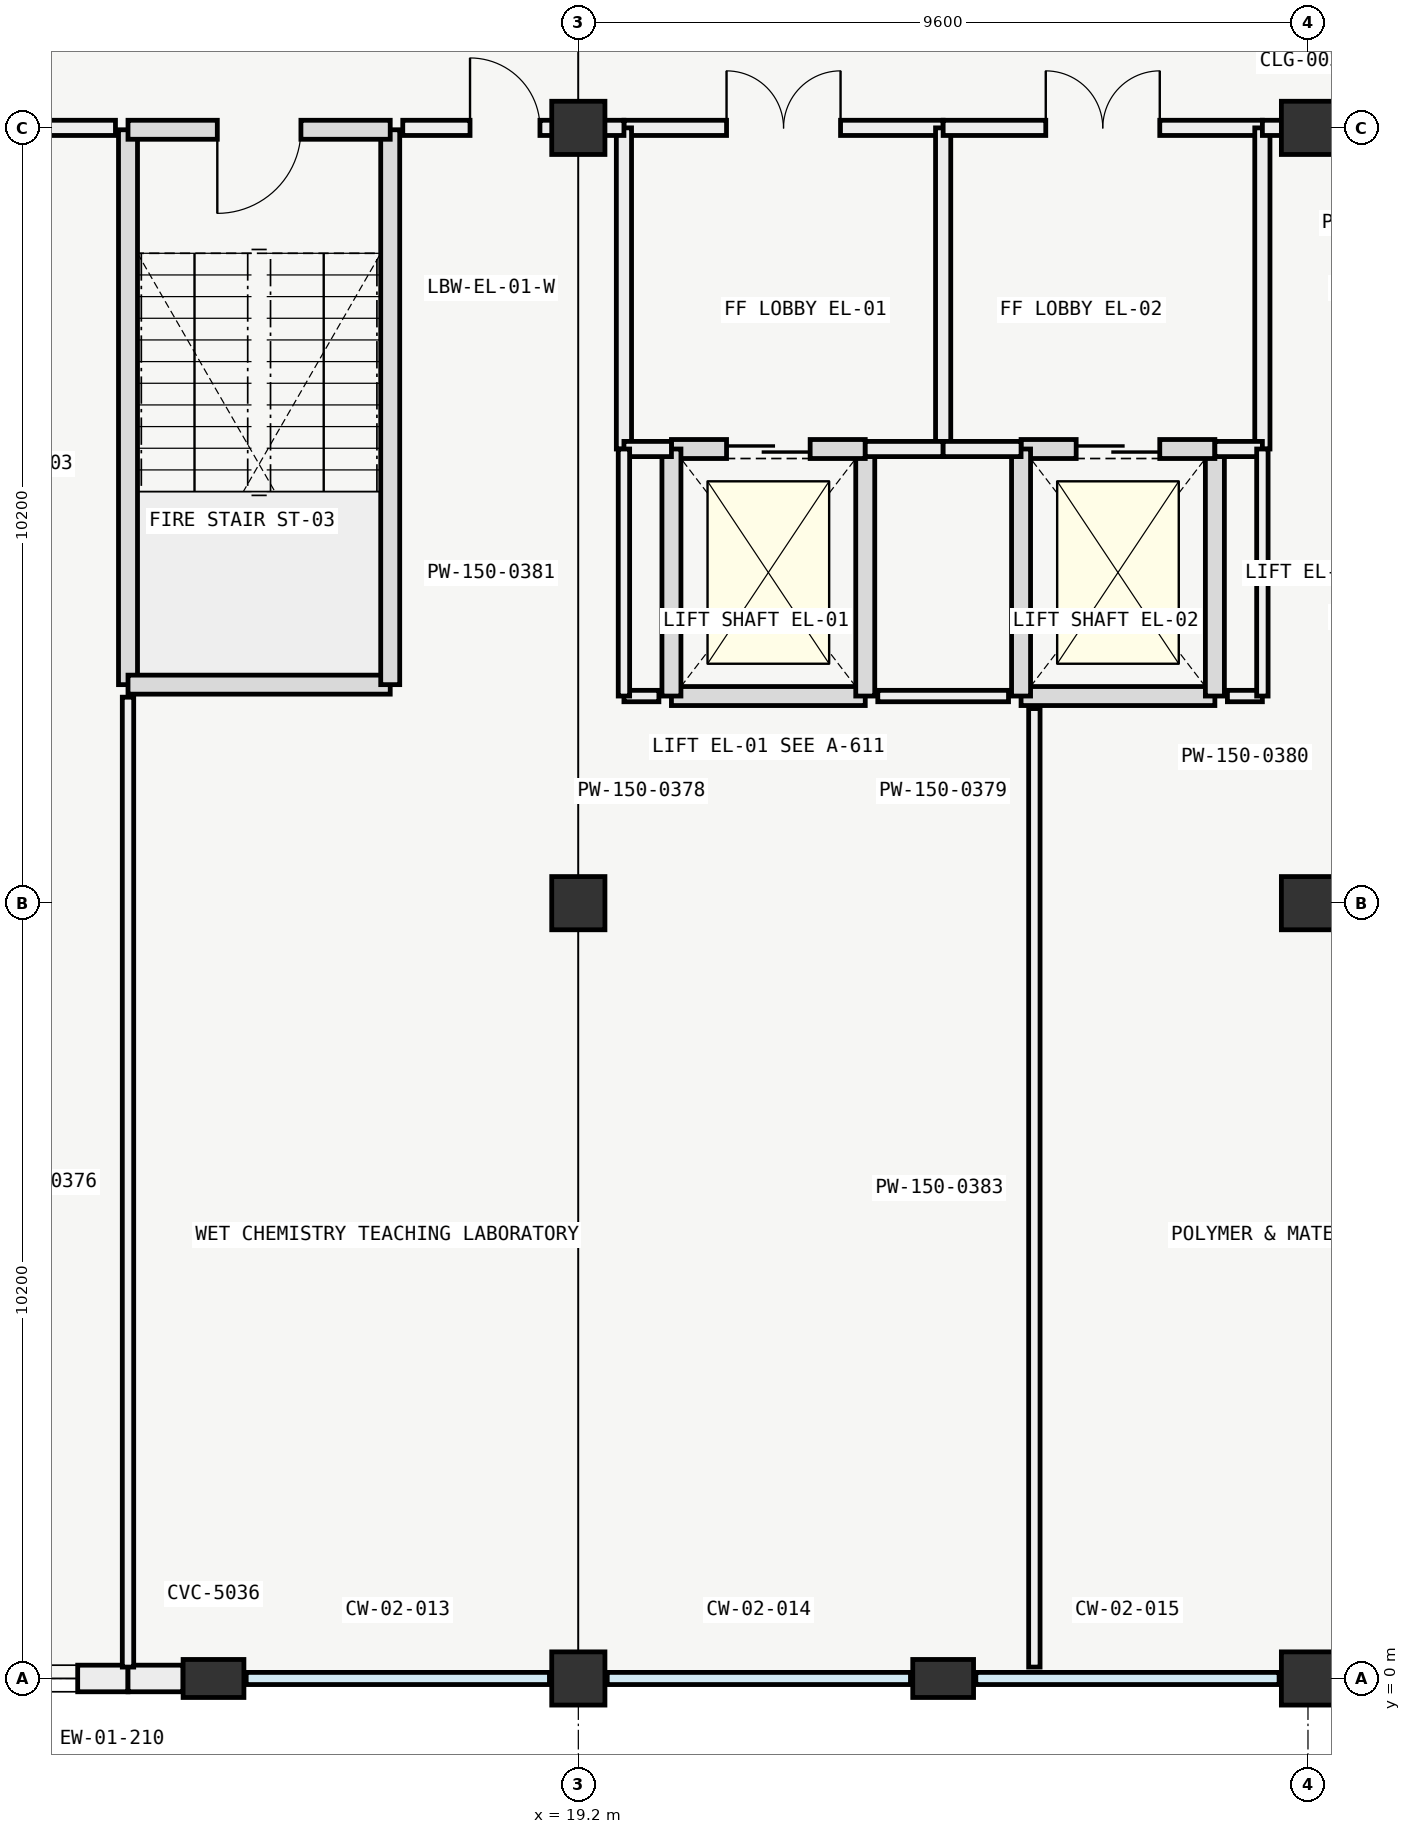
"""IFC4 building model, lengths in metres.
Left out: names, types, materials, properties, quantities, classifications, styles, units other than length and angle.
Written with IfcOpenShell. Run it as: python <this file> out.ifc"""

import sys

from ifc_helpers import new_model, si_unit, direction, frame, frame_2d, origin, origin_2d, place, context, subcontext, project, spatial, rectangle, extrude, element, fill, save


model = new_model("IFC4")
c1 = context("Model", 3, precision=1e-05, world=origin(), true_north=direction((0.0, 1.0)))
c2 = subcontext(c1, "Body", "Model", "MODEL_VIEW")
j1 = project(units=[si_unit("LENGTHUNIT", "METRE"), si_unit("PLANEANGLEUNIT", "RADIAN")], contexts=[c1])
p1 = place(None, origin())
s1 = spatial("IfcSite", under=j1, at=p1, CompositionType="ELEMENT")
p2 = place(p1, origin())
s2 = spatial("IfcBuilding", under=s1, at=p2, CompositionType="ELEMENT")
p3 = place(p2, frame((0.0, 0.0, 9.6)))
s3 = spatial("IfcBuildingStorey", under=s2, at=p3, CompositionType="ELEMENT", Elevation=9.6)
for number, where, z_axis, x_axis in (
    (1, (19.2, 0.0, 0.0), (0.0, 0.0, 1.0), (1.0, 0.0, 0.0)),
    (2, (19.2, 10.2, 0.0), (0.0, 0.0, 1.0), (1.0, 0.0, 0.0)),
    (3, (19.2, 20.4, 0.0), (0.0, 0.0, 1.0), (1.0, 0.0, 0.0)),
    (4, (28.8, 0.0, 0.0), (0.0, 0.0, 1.0), (1.0, 0.0, 0.0)),
    (5, (28.8, 10.2, 0.0), (0.0, 0.0, 1.0), (1.0, 0.0, 0.0)),
    (6, (28.8, 20.4, 0.0), (0.0, 0.0, 1.0), (1.0, 0.0, 0.0)),
):
    element("IfcColumn", number, at=place(p3, frame(where, z_axis=z_axis, x_axis=x_axis)), inside=s3, PredefinedType="COLUMN", context=c2, shape_type="SweptSolid", body=[
        extrude(rectangle(XDim=0.7, YDim=0.7, at=origin_2d()), origin(), (0.0, 0.0, 1.0), 4.2),
    ])
for number, where, z_axis, x_axis in (
    (7, (14.4, 0.0, 0.0), (0.0, 0.0, 1.0), (0.0, 1.0, 0.0)),
    (8, (24.0, 0.0, 0.0), (0.0, 0.0, 1.0), (0.0, 1.0, 0.0)),
):
    element("IfcColumn", number, at=place(p3, frame(where, z_axis=z_axis, x_axis=x_axis)), inside=s3, PredefinedType="PILASTER", context=c2, shape_type="SweptSolid", body=[
        extrude(rectangle(XDim=0.5, YDim=0.8, at=origin_2d()), origin(), (0.0, 0.0, 1.0), 4.2),
    ])
p4 = place(p3, frame((13.275, 0.0, 0.0), z_axis=(0.0, 0.0, 1.0), x_axis=(-1.0, 0.0, 0.0)))
e9 = element("IfcWall", 9, at=p4, inside=s3, PredefinedType="SOLIDWALL", context=c2, shape_type="SweptSolid", body=[
    extrude(rectangle(XDim=3.324, YDim=0.35, at=frame_2d((1.662, 0.0))), origin(), (0.0, 0.0, 1.0), 2.58),
])
p5 = place(p4, frame((0.662, 0.0, 0.8)))
e10 = element("IfcOpeningElement", 10, at=p5, cuts=e9, PredefinedType="OPENING", context=c2, shape_type="SweptSolid", body=[
    extrude(rectangle(XDim=2.0, YDim=1.35, at=frame_2d((1.0, 0.675))), frame((0.0, 0.185, 0.0), z_axis=(0.0, -1.0, 0.0), x_axis=(1.0, 0.0, 0.0)), (0.0, 0.0, 1.0), 0.37),
])
p6 = place(p3, frame((13.999, 0.0, 0.0), z_axis=(0.0, 0.0, 1.0), x_axis=(-1.0, 0.0, 0.0)))
e11 = element("IfcWall", 11, at=p6, inside=s3, PredefinedType="SOLIDWALL", context=c2, shape_type="SweptSolid", body=[
    extrude(rectangle(XDim=0.724, YDim=0.35, at=frame_2d((0.362, 0.0))), origin(), (0.0, 0.0, 1.0), 2.58),
])
p7 = place(p3, frame((13.275, 20.375, 0.0), z_axis=(0.0, 0.0, 1.0), x_axis=(0.0, -1.0, 0.0)))
e12 = element("IfcWall", 12, at=p7, inside=s3, PredefinedType="SOLIDWALL", context=c2, shape_type="SweptSolid", body=[
    extrude(rectangle(XDim=7.3, YDim=0.25, at=frame_2d((3.65, 0.0))), origin(), (0.0, 0.0, 1.0), 3.95),
])
p8 = place(p3, frame((13.275, 13.075, 0.0), z_axis=(0.0, 0.0, 1.0), x_axis=(1.0, 0.0, 0.0)))
e13 = element("IfcWall", 13, at=p8, inside=s3, PredefinedType="SOLIDWALL", context=c2, shape_type="SweptSolid", body=[
    extrude(rectangle(XDim=3.45, YDim=0.25, at=frame_2d((1.725, 0.0))), origin(), (0.0, 0.0, 1.0), 3.95),
])
p9 = place(p3, frame((16.725, 13.075, 0.0), z_axis=(0.0, 0.0, 1.0), x_axis=(0.0, 1.0, 0.0)))
e14 = element("IfcWall", 14, at=p9, inside=s3, PredefinedType="SOLIDWALL", context=c2, shape_type="SweptSolid", body=[
    extrude(rectangle(XDim=7.3, YDim=0.25, at=frame_2d((3.65, 0.0))), origin(), (0.0, 0.0, 1.0), 3.95),
])
p10 = place(p3, frame((16.725, 20.375, 0.0), z_axis=(0.0, 0.0, 1.0), x_axis=(-1.0, 0.0, 0.0)))
e15 = element("IfcWall", 15, at=p10, inside=s3, PredefinedType="SOLIDWALL", context=c2, shape_type="SweptSolid", body=[
    extrude(rectangle(XDim=3.45, YDim=0.25, at=frame_2d((1.725, 0.0))), origin(), (0.0, 0.0, 1.0), 3.95),
])
p11 = place(p10, frame((1.175, 0.0, 0.0)))
e16 = element("IfcOpeningElement", 16, at=p11, cuts=e15, PredefinedType="OPENING", context=c2, shape_type="SweptSolid", body=[
    extrude(rectangle(XDim=1.1, YDim=2.2, at=frame_2d((0.55, 1.1))), frame((0.0, 0.135, 0.0), z_axis=(0.0, -1.0, 0.0), x_axis=(1.0, 0.0, 0.0)), (0.0, 0.0, 1.0), 0.27),
])
p12 = place(p3, frame((20.425, 12.925, 0.0), z_axis=(0.0, 0.0, 1.0), x_axis=(1.0, 0.0, 0.0)))
e17 = element("IfcWall", 17, at=p12, inside=s3, PredefinedType="SOLIDWALL", context=c2, shape_type="SweptSolid", body=[
    extrude(rectangle(XDim=2.55, YDim=0.25, at=frame_2d((1.275, 0.0))), origin(), (0.0, 0.0, 1.0), 3.95),
])
p13 = place(p3, frame((22.975, 12.925, 0.0), z_axis=(0.0, 0.0, 1.0), x_axis=(0.0, 1.0, 0.0)))
e18 = element("IfcWall", 18, at=p13, inside=s3, PredefinedType="SOLIDWALL", context=c2, shape_type="SweptSolid", body=[
    extrude(rectangle(XDim=3.25, YDim=0.25, at=frame_2d((1.625, 0.0))), origin(), (0.0, 0.0, 1.0), 3.95),
])
p14 = place(p3, frame((22.975, 16.175, 0.0), z_axis=(0.0, 0.0, 1.0), x_axis=(-1.0, 0.0, 0.0)))
e19 = element("IfcWall", 19, at=p14, inside=s3, PredefinedType="SOLIDWALL", context=c2, shape_type="SweptSolid", body=[
    extrude(rectangle(XDim=2.55, YDim=0.25, at=frame_2d((1.275, 0.0))), origin(), (0.0, 0.0, 1.0), 3.95),
])
p15 = place(p14, frame((0.725, 0.0, 0.0)))
e20 = element("IfcOpeningElement", 20, at=p15, cuts=e19, PredefinedType="OPENING", context=c2, shape_type="SweptSolid", body=[
    extrude(rectangle(XDim=1.1, YDim=2.1, at=frame_2d((0.55, 1.05))), frame((0.0, 0.135, 0.0), z_axis=(0.0, -1.0, 0.0), x_axis=(1.0, 0.0, 0.0)), (0.0, 0.0, 1.0), 0.27),
])
p16 = place(p3, frame((20.425, 16.175, 0.0), z_axis=(0.0, 0.0, 1.0), x_axis=(0.0, -1.0, 0.0)))
e21 = element("IfcWall", 21, at=p16, inside=s3, PredefinedType="SOLIDWALL", context=c2, shape_type="SweptSolid", body=[
    extrude(rectangle(XDim=3.25, YDim=0.25, at=frame_2d((1.625, 0.0))), origin(), (0.0, 0.0, 1.0), 3.95),
])
p17 = place(p3, frame((19.8, 20.4, 0.0), z_axis=(0.0, 0.0, 1.0), x_axis=(1.0, 0.0, 0.0)))
e22 = element("IfcWall", 22, at=p17, inside=s3, PredefinedType="PARTITIONING", context=c2, shape_type="SweptSolid", body=[
    extrude(rectangle(XDim=4.2, YDim=0.2, at=frame_2d((2.1, 0.0))), origin(), (0.0, 0.0, 1.0), 3.33),
])
p18 = place(p17, frame((1.35, 0.0, 0.0)))
e23 = element("IfcOpeningElement", 23, at=p18, cuts=e22, PredefinedType="OPENING", context=c2, shape_type="SweptSolid", body=[
    extrude(rectangle(XDim=1.5, YDim=2.2, at=frame_2d((0.75, 1.1))), frame((0.0, 0.11, 0.0), z_axis=(0.0, -1.0, 0.0), x_axis=(1.0, 0.0, 0.0)), (0.0, 0.0, 1.0), 0.22),
])
for number, where, z_axis, x_axis in (
    (24, (19.8, 16.175, 0.0), (0.0, 0.0, 1.0), (0.0, 1.0, 0.0)),
    (25, (24.0, 16.175, 0.0), (0.0, 0.0, 1.0), (0.0, 1.0, 0.0)),
):
    element("IfcWall", number, at=place(p3, frame(where, z_axis=z_axis, x_axis=x_axis)), inside=s3, PredefinedType="PARTITIONING", context=c2, shape_type="SweptSolid", body=[
        extrude(rectangle(XDim=4.225, YDim=0.2, at=frame_2d((2.112, 0.0))), origin(), (0.0, 0.0, 1.0), 3.33),
    ])
p19 = place(p3, frame((19.8, 16.175, 0.0), z_axis=(0.0, 0.0, 1.0), x_axis=(1.0, 0.0, 0.0)))
e26 = element("IfcWall", 26, at=p19, inside=s3, PredefinedType="PARTITIONING", context=c2, shape_type="SweptSolid", body=[
    extrude(rectangle(XDim=0.625, YDim=0.2, at=frame_2d((0.312, 0.0))), origin(), (0.0, 0.0, 1.0), 3.55),
])
p20 = place(p3, frame((22.975, 16.175, 0.0), z_axis=(0.0, 0.0, 1.0), x_axis=(1.0, 0.0, 0.0)))
e27 = element("IfcWall", 27, at=p20, inside=s3, PredefinedType="PARTITIONING", context=c2, shape_type="SweptSolid", body=[
    extrude(rectangle(XDim=1.025, YDim=0.2, at=frame_2d((0.512, 0.0))), origin(), (0.0, 0.0, 1.0), 3.55),
])
p21 = place(p3, frame((25.025, 12.925, 0.0), z_axis=(0.0, 0.0, 1.0), x_axis=(1.0, 0.0, 0.0)))
e28 = element("IfcWall", 28, at=p21, inside=s3, PredefinedType="SOLIDWALL", context=c2, shape_type="SweptSolid", body=[
    extrude(rectangle(XDim=2.55, YDim=0.25, at=frame_2d((1.275, 0.0))), origin(), (0.0, 0.0, 1.0), 3.95),
])
p22 = place(p3, frame((27.575, 12.925, 0.0), z_axis=(0.0, 0.0, 1.0), x_axis=(0.0, 1.0, 0.0)))
e29 = element("IfcWall", 29, at=p22, inside=s3, PredefinedType="SOLIDWALL", context=c2, shape_type="SweptSolid", body=[
    extrude(rectangle(XDim=3.25, YDim=0.25, at=frame_2d((1.625, 0.0))), origin(), (0.0, 0.0, 1.0), 3.95),
])
p23 = place(p3, frame((27.575, 16.175, 0.0), z_axis=(0.0, 0.0, 1.0), x_axis=(-1.0, 0.0, 0.0)))
e30 = element("IfcWall", 30, at=p23, inside=s3, PredefinedType="SOLIDWALL", context=c2, shape_type="SweptSolid", body=[
    extrude(rectangle(XDim=2.55, YDim=0.25, at=frame_2d((1.275, 0.0))), origin(), (0.0, 0.0, 1.0), 3.95),
])
p24 = place(p23, frame((0.725, 0.0, 0.0)))
e31 = element("IfcOpeningElement", 31, at=p24, cuts=e30, PredefinedType="OPENING", context=c2, shape_type="SweptSolid", body=[
    extrude(rectangle(XDim=1.1, YDim=2.1, at=frame_2d((0.55, 1.05))), frame((0.0, 0.135, 0.0), z_axis=(0.0, -1.0, 0.0), x_axis=(1.0, 0.0, 0.0)), (0.0, 0.0, 1.0), 0.27),
])
p25 = place(p3, frame((25.025, 16.175, 0.0), z_axis=(0.0, 0.0, 1.0), x_axis=(0.0, -1.0, 0.0)))
e32 = element("IfcWall", 32, at=p25, inside=s3, PredefinedType="SOLIDWALL", context=c2, shape_type="SweptSolid", body=[
    extrude(rectangle(XDim=3.25, YDim=0.25, at=frame_2d((1.625, 0.0))), origin(), (0.0, 0.0, 1.0), 3.95),
])
p26 = place(p3, frame((24.0, 20.4, 0.0), z_axis=(0.0, 0.0, 1.0), x_axis=(1.0, 0.0, 0.0)))
e33 = element("IfcWall", 33, at=p26, inside=s3, PredefinedType="PARTITIONING", context=c2, shape_type="SweptSolid", body=[
    extrude(rectangle(XDim=4.2, YDim=0.2, at=frame_2d((2.1, 0.0))), origin(), (0.0, 0.0, 1.0), 3.33),
])
p27 = place(p26, frame((1.35, 0.0, 0.0)))
e34 = element("IfcOpeningElement", 34, at=p27, cuts=e33, PredefinedType="OPENING", context=c2, shape_type="SweptSolid", body=[
    extrude(rectangle(XDim=1.5, YDim=2.2, at=frame_2d((0.75, 1.1))), frame((0.0, 0.11, 0.0), z_axis=(0.0, -1.0, 0.0), x_axis=(1.0, 0.0, 0.0)), (0.0, 0.0, 1.0), 0.22),
])
p28 = place(p3, frame((28.2, 16.175, 0.0), z_axis=(0.0, 0.0, 1.0), x_axis=(0.0, 1.0, 0.0)))
e35 = element("IfcWall", 35, at=p28, inside=s3, PredefinedType="PARTITIONING", context=c2, shape_type="SweptSolid", body=[
    extrude(rectangle(XDim=4.225, YDim=0.2, at=frame_2d((2.112, 0.0))), origin(), (0.0, 0.0, 1.0), 3.33),
])
p29 = place(p3, frame((24.0, 16.175, 0.0), z_axis=(0.0, 0.0, 1.0), x_axis=(1.0, 0.0, 0.0)))
e36 = element("IfcWall", 36, at=p29, inside=s3, PredefinedType="PARTITIONING", context=c2, shape_type="SweptSolid", body=[
    extrude(rectangle(XDim=1.025, YDim=0.2, at=frame_2d((0.512, 0.0))), origin(), (0.0, 0.0, 1.0), 3.55),
])
p30 = place(p3, frame((27.575, 16.175, 0.0), z_axis=(0.0, 0.0, 1.0), x_axis=(1.0, 0.0, 0.0)))
e37 = element("IfcWall", 37, at=p30, inside=s3, PredefinedType="PARTITIONING", context=c2, shape_type="SweptSolid", body=[
    extrude(rectangle(XDim=0.625, YDim=0.2, at=frame_2d((0.312, 0.0))), origin(), (0.0, 0.0, 1.0), 3.55),
])
p31 = place(p3, frame((13.275, 0.15, 0.0), z_axis=(0.0, 0.0, 1.0), x_axis=(0.0, 1.0, 0.0)))
e38 = element("IfcWall", 38, at=p31, inside=s3, PredefinedType="PARTITIONING", context=c2, shape_type="SweptSolid", body=[
    extrude(rectangle(XDim=12.76, YDim=0.15, at=frame_2d((6.38, 0.0))), origin(), (0.0, 0.0, 1.0), 3.33),
])
p32 = place(p3, frame((0.15, 20.4, 0.0), z_axis=(0.0, 0.0, 1.0), x_axis=(1.0, 0.0, 0.0)))
e39 = element("IfcWall", 39, at=p32, inside=s3, PredefinedType="PARTITIONING", context=c2, shape_type="SweptSolid", body=[
    extrude(rectangle(XDim=12.96, YDim=0.2, at=frame_2d((6.48, 0.0))), origin(), (0.0, 0.0, 1.0), 3.28),
])
p33 = place(p32, frame((6.05, 0.0, 0.0)))
e40 = element("IfcOpeningElement", 40, at=p33, cuts=e39, PredefinedType="OPENING", context=c2, shape_type="SweptSolid", body=[
    extrude(rectangle(XDim=1.5, YDim=2.2, at=frame_2d((0.75, 1.1))), frame((0.0, 0.11, 0.0), z_axis=(0.0, -1.0, 0.0), x_axis=(1.0, 0.0, 0.0)), (0.0, 0.0, 1.0), 0.22),
])
p34 = place(p3, frame((19.8, 12.925, 0.0), z_axis=(0.0, 0.0, 1.0), x_axis=(1.0, 0.0, 0.0)))
e41 = element("IfcWall", 41, at=p34, inside=s3, PredefinedType="PARTITIONING", context=c2, shape_type="SweptSolid", body=[
    extrude(rectangle(XDim=0.46, YDim=0.15, at=frame_2d((0.23, 0.0))), origin(), (0.0, 0.0, 1.0), 3.85),
])
p35 = place(p3, frame((23.14, 12.925, 0.0), z_axis=(0.0, 0.0, 1.0), x_axis=(1.0, 0.0, 0.0)))
e42 = element("IfcWall", 42, at=p35, inside=s3, PredefinedType="PARTITIONING", context=c2, shape_type="SweptSolid", body=[
    extrude(rectangle(XDim=1.72, YDim=0.15, at=frame_2d((0.86, 0.0))), origin(), (0.0, 0.0, 1.0), 3.85),
])
p36 = place(p3, frame((27.74, 12.925, 0.0), z_axis=(0.0, 0.0, 1.0), x_axis=(1.0, 0.0, 0.0)))
e43 = element("IfcWall", 43, at=p36, inside=s3, PredefinedType="PARTITIONING", context=c2, shape_type="SweptSolid", body=[
    extrude(rectangle(XDim=0.46, YDim=0.15, at=frame_2d((0.23, 0.0))), origin(), (0.0, 0.0, 1.0), 3.85),
])
p37 = place(p3, frame((19.8, 12.925, 0.0), z_axis=(0.0, 0.0, 1.0), x_axis=(0.0, 1.0, 0.0)))
e44 = element("IfcWall", 44, at=p37, inside=s3, PredefinedType="PARTITIONING", context=c2, shape_type="SweptSolid", body=[
    extrude(rectangle(XDim=3.25, YDim=0.15, at=frame_2d((1.625, 0.0))), origin(), (0.0, 0.0, 1.0), 3.85),
])
p38 = place(p3, frame((16.89, 20.4, 0.0), z_axis=(0.0, 0.0, 1.0), x_axis=(1.0, 0.0, 0.0)))
e45 = element("IfcWall", 45, at=p38, inside=s3, PredefinedType="PARTITIONING", context=c2, shape_type="SweptSolid", body=[
    extrude(rectangle(XDim=2.91, YDim=0.2, at=frame_2d((1.455, 0.0))), origin(), (0.0, 0.0, 1.0), 3.28),
])
p39 = place(p38, frame((0.885, 0.0, 0.0)))
e46 = element("IfcOpeningElement", 46, at=p39, cuts=e45, PredefinedType="OPENING", context=c2, shape_type="SweptSolid", body=[
    extrude(rectangle(XDim=0.92, YDim=2.1, at=frame_2d((0.46, 1.05))), frame((0.0, 0.11, 0.0), z_axis=(0.0, -1.0, 0.0), x_axis=(1.0, 0.0, 0.0)), (0.0, 0.0, 1.0), 0.22),
])
p40 = place(p3, frame((25.2, 0.15, 0.0), z_axis=(0.0, 0.0, 1.0), x_axis=(0.0, 1.0, 0.0)))
e47 = element("IfcWall", 47, at=p40, inside=s3, PredefinedType="PARTITIONING", context=c2, shape_type="SweptSolid", body=[
    extrude(rectangle(XDim=12.61, YDim=0.15, at=frame_2d((6.305, 0.0))), origin(), (0.0, 0.0, 1.0), 3.33),
])
p41 = place(p3, frame((28.2, 12.925, 0.0), z_axis=(0.0, 0.0, 1.0), x_axis=(0.0, 1.0, 0.0)))
e48 = element("IfcWall", 48, at=p41, inside=s3, PredefinedType="PARTITIONING", context=c2, shape_type="SweptSolid", body=[
    extrude(rectangle(XDim=3.25, YDim=0.15, at=frame_2d((1.625, 0.0))), origin(), (0.0, 0.0, 1.0), 3.85),
])
p42 = place(p3, frame((28.2, 20.4, 0.0), z_axis=(0.0, 0.0, 1.0), x_axis=(1.0, 0.0, 0.0)))
e49 = element("IfcWall", 49, at=p42, inside=s3, PredefinedType="PARTITIONING", context=c2, shape_type="SweptSolid", body=[
    extrude(rectangle(XDim=3.11, YDim=0.2, at=frame_2d((1.555, 0.0))), origin(), (0.0, 0.0, 1.0), 3.28),
])
p43 = place(p42, frame((2.03, 0.0, 0.0)))
e50 = element("IfcOpeningElement", 50, at=p43, cuts=e49, PredefinedType="OPENING", context=c2, shape_type="SweptSolid", body=[
    extrude(rectangle(XDim=0.92, YDim=2.1, at=frame_2d((0.46, 1.05))), frame((0.0, 0.11, 0.0), z_axis=(0.0, -1.0, 0.0), x_axis=(1.0, 0.0, 0.0)), (0.0, 0.0, 1.0), 0.22),
])
p44 = place(p5, origin())
e51 = element("IfcWindow", 51, at=p44, inside=s3, PartitioningType="SINGLE_PANEL", PredefinedType="WINDOW", context=c2, shape_type="SweptSolid", body=[
    extrude(rectangle(XDim=2.0, YDim=1.35, at=frame_2d((1.0, 0.675))), frame((0.0, 0.03, 0.0), z_axis=(0.0, -1.0, 0.0), x_axis=(1.0, 0.0, 0.0)), (0.0, 0.0, 1.0), 0.06),
])
fill(e10, e51)
p45 = place(p11, origin())
e52 = element("IfcDoor", 52, at=p45, inside=s3, OperationType="SINGLE_SWING_RIGHT", PredefinedType="DOOR", context=c2, shape_type="SweptSolid", body=[
    extrude(rectangle(XDim=1.1, YDim=2.2, at=frame_2d((0.55, 1.1))), frame((0.0, 0.025, 0.0), z_axis=(0.0, -1.0, 0.0), x_axis=(1.0, 0.0, 0.0)), (0.0, 0.0, 1.0), 0.05),
])
fill(e16, e52)
p46 = place(p15, origin())
e53 = element("IfcDoor", 53, at=p46, inside=s3, OperationType="SLIDING_TO_LEFT", PredefinedType="DOOR", context=c2, shape_type="SweptSolid", body=[
    extrude(rectangle(XDim=1.1, YDim=2.1, at=frame_2d((0.55, 1.05))), frame((0.0, 0.025, 0.0), z_axis=(0.0, -1.0, 0.0), x_axis=(1.0, 0.0, 0.0)), (0.0, 0.0, 1.0), 0.05),
])
fill(e20, e53)
p47 = place(p18, origin())
e54 = element("IfcDoor", 54, at=p47, inside=s3, OperationType="SINGLE_SWING_LEFT", PredefinedType="DOOR", context=c2, shape_type="SweptSolid", body=[
    extrude(rectangle(XDim=1.5, YDim=2.2, at=frame_2d((0.75, 1.1))), frame((0.0, 0.025, 0.0), z_axis=(0.0, -1.0, 0.0), x_axis=(1.0, 0.0, 0.0)), (0.0, 0.0, 1.0), 0.05),
])
fill(e23, e54)
p48 = place(p24, origin())
e55 = element("IfcDoor", 55, at=p48, inside=s3, OperationType="SLIDING_TO_LEFT", PredefinedType="DOOR", context=c2, shape_type="SweptSolid", body=[
    extrude(rectangle(XDim=1.1, YDim=2.1, at=frame_2d((0.55, 1.05))), frame((0.0, 0.025, 0.0), z_axis=(0.0, -1.0, 0.0), x_axis=(1.0, 0.0, 0.0)), (0.0, 0.0, 1.0), 0.05),
])
fill(e31, e55)
p49 = place(p27, origin())
e56 = element("IfcDoor", 56, at=p49, inside=s3, OperationType="SINGLE_SWING_LEFT", PredefinedType="DOOR", context=c2, shape_type="SweptSolid", body=[
    extrude(rectangle(XDim=1.5, YDim=2.2, at=frame_2d((0.75, 1.1))), frame((0.0, 0.025, 0.0), z_axis=(0.0, -1.0, 0.0), x_axis=(1.0, 0.0, 0.0)), (0.0, 0.0, 1.0), 0.05),
])
fill(e34, e56)
p50 = place(p39, origin())
e57 = element("IfcDoor", 57, at=p50, inside=s3, OperationType="SINGLE_SWING_LEFT", PredefinedType="DOOR", context=c2, shape_type="SweptSolid", body=[
    extrude(rectangle(XDim=0.92, YDim=2.1, at=frame_2d((0.46, 1.05))), frame((0.0, 0.025, 0.0), z_axis=(0.0, -1.0, 0.0), x_axis=(1.0, 0.0, 0.0)), (0.0, 0.0, 1.0), 0.05),
])
fill(e46, e57)
save(model, sys.argv[1])
